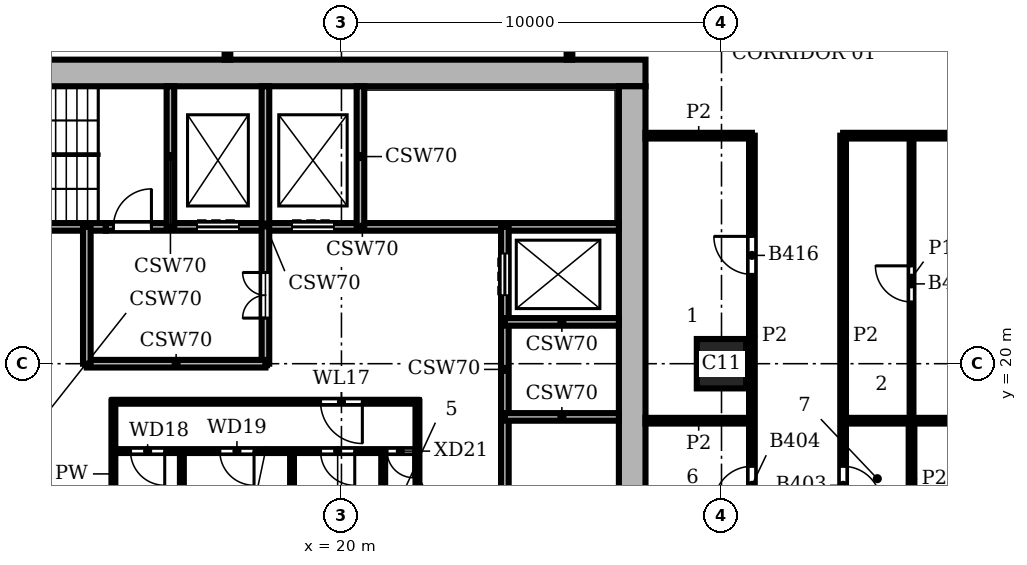
"""IFC4 building model, lengths in metres.
Left out: names, types, materials, properties, quantities, classifications, styles, units other than length and angle.
Written with IfcOpenShell. Run it as: python <this file> out.ifc"""

import sys

from ifc_helpers import new_model, si_unit, direction, frame, frame_2d, origin, origin_2d, place, context, subcontext, project, spatial, rectangle, extrude, element, fill, save


model = new_model("IFC4")
c1 = context("Model", 3, precision=1e-05, world=origin(), true_north=direction((0.0, 1.0)))
c2 = subcontext(c1, "Body", "Model", "MODEL_VIEW")
j1 = project(units=[si_unit("LENGTHUNIT", "METRE"), si_unit("PLANEANGLEUNIT", "RADIAN")], contexts=[c1])
p1 = place(None, origin())
s1 = spatial("IfcSite", under=j1, at=p1, CompositionType="ELEMENT")
p2 = place(p1, origin())
s2 = spatial("IfcBuilding", under=s1, at=p2, CompositionType="ELEMENT")
p3 = place(p2, frame((0.0, 0.0, 166.8)))
s3 = spatial("IfcBuildingStorey", under=s2, at=p3, CompositionType="ELEMENT", Elevation=166.8)
p4 = place(p3, frame((30.0, 20.0, 0.0), z_axis=(0.0, 0.0, 1.0), x_axis=(1.0, 0.0, 0.0)))
e1 = element("IfcColumn", 1, at=p4, inside=s3, PredefinedType="COLUMN", context=c2, shape_type="SweptSolid", body=[
    extrude(rectangle(XDim=1.3, YDim=1.3, at=origin_2d()), origin(), (0.0, 0.0, 1.0), 3.9),
])
p5 = place(p3, frame((27.65, 8.7, 0.0), z_axis=(0.0, 0.0, 1.0), x_axis=(0.0, 1.0, 0.0)))
e2 = element("IfcWall", 2, at=p5, inside=s3, PredefinedType="SHEAR", context=c2, shape_type="SweptSolid", body=[
    extrude(rectangle(XDim=18.6, YDim=0.7, at=frame_2d((9.3, 0.0))), origin(), (0.0, 0.0, 1.0), 3.9),
])
p6 = place(p5, frame((4.75, 0.0, 0.0)))
e3 = element("IfcOpeningElement", 3, at=p6, cuts=e2, PredefinedType="OPENING", context=c2, shape_type="SweptSolid", body=[
    extrude(rectangle(XDim=1.6, YDim=2.1, at=frame_2d((0.8, 1.05))), frame((0.0, 0.36, 0.0), z_axis=(0.0, -1.0, 0.0), x_axis=(1.0, 0.0, 0.0)), (0.0, 0.0, 1.0), 0.72),
])
p7 = place(p3, frame((28.0, 27.65, 0.0), z_axis=(0.0, 0.0, 1.0), x_axis=(-1.0, 0.0, 0.0)))
e4 = element("IfcWall", 4, at=p7, inside=s3, PredefinedType="SHEAR", context=c2, shape_type="SweptSolid", body=[
    extrude(rectangle(XDim=20.0, YDim=0.7, at=frame_2d((10.0, 0.0))), origin(), (0.0, 0.0, 1.0), 3.9),
])
p8 = place(p3, frame((14.0, 17.7, 0.0), z_axis=(0.0, 0.0, 1.0), x_axis=(1.0, 0.0, 0.0)))
e5 = element("IfcWall", 5, at=p8, inside=s3, PredefinedType="PARTITIONING", context=c2, shape_type="SweptSolid", body=[
    extrude(rectangle(XDim=8.0, YDim=0.1, at=frame_2d((4.0, 0.0))), origin(), (0.0, 0.0, 1.0), 3.58),
])
p9 = place(p8, frame((0.45, 0.0, 0.0)))
e6 = element("IfcOpeningElement", 6, at=p9, cuts=e5, PredefinedType="OPENING", context=c2, shape_type="SweptSolid", body=[
    extrude(rectangle(XDim=0.9, YDim=2.1, at=frame_2d((0.45, 1.05))), frame((0.0, 0.06, 0.0), z_axis=(0.0, -1.0, 0.0), x_axis=(1.0, 0.0, 0.0)), (0.0, 0.0, 1.0), 0.12),
])
p10 = place(p8, frame((2.8, 0.0, 0.0)))
e7 = element("IfcOpeningElement", 7, at=p10, cuts=e5, PredefinedType="OPENING", context=c2, shape_type="SweptSolid", body=[
    extrude(rectangle(XDim=0.9, YDim=2.1, at=frame_2d((0.45, 1.05))), frame((0.0, 0.06, 0.0), z_axis=(0.0, -1.0, 0.0), x_axis=(1.0, 0.0, 0.0)), (0.0, 0.0, 1.0), 0.12),
])
p11 = place(p8, frame((5.45, 0.0, 0.0)))
e8 = element("IfcOpeningElement", 8, at=p11, cuts=e5, PredefinedType="OPENING", context=c2, shape_type="SweptSolid", body=[
    extrude(rectangle(XDim=0.9, YDim=2.1, at=frame_2d((0.45, 1.05))), frame((0.0, 0.06, 0.0), z_axis=(0.0, -1.0, 0.0), x_axis=(1.0, 0.0, 0.0)), (0.0, 0.0, 1.0), 0.12),
])
p12 = place(p8, frame((7.2, 0.0, 0.0)))
e9 = element("IfcOpeningElement", 9, at=p12, cuts=e5, PredefinedType="OPENING", context=c2, shape_type="SweptSolid", body=[
    extrude(rectangle(XDim=0.7, YDim=2.1, at=frame_2d((0.35, 1.05))), frame((0.0, 0.06, 0.0), z_axis=(0.0, -1.0, 0.0), x_axis=(1.0, 0.0, 0.0)), (0.0, 0.0, 1.0), 0.12),
])
p13 = place(p3, frame((24.3, 18.6, 0.0), z_axis=(0.0, 0.0, 1.0), x_axis=(1.0, 0.0, 0.0)))
e10 = element("IfcWall", 10, at=p13, inside=s3, PredefinedType="SHEAR", context=c2, shape_type="SweptSolid", body=[
    extrude(rectangle(XDim=3.0, YDim=0.2, at=frame_2d((1.5, 0.0))), origin(), (0.0, 0.0, 1.0), 3.58),
])
p14 = place(p3, frame((14.0, 19.0, 0.0), z_axis=(0.0, 0.0, 1.0), x_axis=(1.0, 0.0, 0.0)))
e11 = element("IfcWall", 11, at=p14, inside=s3, PredefinedType="PARTITIONING", context=c2, shape_type="SweptSolid", body=[
    extrude(rectangle(XDim=8.0, YDim=0.1, at=frame_2d((4.0, 0.0))), origin(), (0.0, 0.0, 1.0), 3.58),
])
p15 = place(p14, frame((5.45, 0.0, 0.0)))
e12 = element("IfcOpeningElement", 12, at=p15, cuts=e11, PredefinedType="OPENING", context=c2, shape_type="SweptSolid", body=[
    extrude(rectangle(XDim=1.1, YDim=2.1, at=frame_2d((0.55, 1.05))), frame((0.0, 0.06, 0.0), z_axis=(0.0, -1.0, 0.0), x_axis=(1.0, 0.0, 0.0)), (0.0, 0.0, 1.0), 0.12),
])
p16 = place(p3, frame((13.3, 20.0, 0.0), z_axis=(0.0, 0.0, 1.0), x_axis=(1.0, 0.0, 0.0)))
e13 = element("IfcWall", 13, at=p16, inside=s3, PredefinedType="SHEAR", context=c2, shape_type="SweptSolid", body=[
    extrude(rectangle(XDim=4.7, YDim=0.2, at=frame_2d((2.35, 0.0))), origin(), (0.0, 0.0, 1.0), 3.58),
])
p17 = place(p3, frame((24.3, 21.1, 0.0), z_axis=(0.0, 0.0, 1.0), x_axis=(1.0, 0.0, 0.0)))
e14 = element("IfcWall", 14, at=p17, inside=s3, PredefinedType="SHEAR", context=c2, shape_type="SweptSolid", body=[
    extrude(rectangle(XDim=3.0, YDim=0.2, at=frame_2d((1.5, 0.0))), origin(), (0.0, 0.0, 1.0), 3.58),
])
p18 = place(p3, frame((8.7, 23.6, 0.0), z_axis=(0.0, 0.0, 1.0), x_axis=(1.0, 0.0, 0.0)))
e15 = element("IfcWall", 15, at=p18, inside=s3, PredefinedType="SHEAR", context=c2, shape_type="SweptSolid", body=[
    extrude(rectangle(XDim=5.1, YDim=0.2, at=frame_2d((2.55, 0.0))), origin(), (0.0, 0.0, 1.0), 3.58),
])
p19 = place(p3, frame((13.8, 23.6, 0.0), z_axis=(0.0, 0.0, 1.0), x_axis=(1.0, 0.0, 0.0)))
e16 = element("IfcWall", 16, at=p19, inside=s3, PredefinedType="SHEAR", context=c2, shape_type="SweptSolid", body=[
    extrude(rectangle(XDim=13.5, YDim=0.2, at=frame_2d((6.75, 0.0))), origin(), (0.0, 0.0, 1.0), 3.58),
])
p20 = place(p19, frame((2.4, 0.0, 0.0)))
e17 = element("IfcOpeningElement", 17, at=p20, cuts=e16, PredefinedType="OPENING", context=c2, shape_type="SweptSolid", body=[
    extrude(rectangle(XDim=1.1, YDim=2.1, at=frame_2d((0.55, 1.05))), frame((0.0, 0.11, 0.0), z_axis=(0.0, -1.0, 0.0), x_axis=(1.0, 0.0, 0.0)), (0.0, 0.0, 1.0), 0.22),
])
p21 = place(p19, frame((4.9, 0.0, 0.0)))
e18 = element("IfcOpeningElement", 18, at=p21, cuts=e16, PredefinedType="OPENING", context=c2, shape_type="SweptSolid", body=[
    extrude(rectangle(XDim=1.1, YDim=2.1, at=frame_2d((0.55, 1.05))), frame((0.0, 0.11, 0.0), z_axis=(0.0, -1.0, 0.0), x_axis=(1.0, 0.0, 0.0)), (0.0, 0.0, 1.0), 0.22),
])
p22 = place(p19, frame((0.2, 0.0, 0.0)))
e19 = element("IfcOpeningElement", 19, at=p22, cuts=e16, PredefinedType="OPENING", context=c2, shape_type="SweptSolid", body=[
    extrude(rectangle(XDim=1.0, YDim=2.1, at=frame_2d((0.5, 1.05))), frame((0.0, 0.11, 0.0), z_axis=(0.0, -1.0, 0.0), x_axis=(1.0, 0.0, 0.0)), (0.0, 0.0, 1.0), 0.22),
])
p23 = place(p3, frame((13.3, 20.0, 0.0), z_axis=(0.0, 0.0, 1.0), x_axis=(0.0, 1.0, 0.0)))
e20 = element("IfcWall", 20, at=p23, inside=s3, PredefinedType="SHEAR", context=c2, shape_type="SweptSolid", body=[
    extrude(rectangle(XDim=3.6, YDim=0.2, at=frame_2d((1.8, 0.0))), origin(), (0.0, 0.0, 1.0), 3.58),
])
p24 = place(p3, frame((14.0, 15.2, 0.0), z_axis=(0.0, 0.0, 1.0), x_axis=(0.0, 1.0, 0.0)))
e21 = element("IfcWall", 21, at=p24, inside=s3, PredefinedType="PARTITIONING", context=c2, shape_type="SweptSolid", body=[
    extrude(rectangle(XDim=3.8, YDim=0.1, at=frame_2d((1.9, 0.0))), origin(), (0.0, 0.0, 1.0), 3.58),
])
p25 = place(p3, frame((15.5, 23.6, 0.0), z_axis=(0.0, 0.0, 1.0), x_axis=(0.0, 1.0, 0.0)))
e22 = element("IfcWall", 22, at=p25, inside=s3, PredefinedType="SHEAR", context=c2, shape_type="SweptSolid", body=[
    extrude(rectangle(XDim=3.7, YDim=0.2, at=frame_2d((1.85, 0.0))), origin(), (0.0, 0.0, 1.0), 3.58),
])
p26 = place(p3, frame((15.8, 15.2, 0.0), z_axis=(0.0, 0.0, 1.0), x_axis=(0.0, 1.0, 0.0)))
e23 = element("IfcWall", 23, at=p26, inside=s3, PredefinedType="PARTITIONING", context=c2, shape_type="SweptSolid", body=[
    extrude(rectangle(XDim=2.5, YDim=0.1, at=frame_2d((1.25, 0.0))), origin(), (0.0, 0.0, 1.0), 3.58),
])
p27 = place(p3, frame((18.0, 20.0, 0.0), z_axis=(0.0, 0.0, 1.0), x_axis=(0.0, 1.0, 0.0)))
e24 = element("IfcWall", 24, at=p27, inside=s3, PredefinedType="SHEAR", context=c2, shape_type="SweptSolid", body=[
    extrude(rectangle(XDim=7.3, YDim=0.2, at=frame_2d((3.65, 0.0))), origin(), (0.0, 0.0, 1.0), 3.58),
])
p28 = place(p27, frame((1.2, 0.0, 0.0)))
e25 = element("IfcOpeningElement", 25, at=p28, cuts=e24, PredefinedType="OPENING", context=c2, shape_type="SweptSolid", body=[
    extrude(rectangle(XDim=1.2, YDim=2.1, at=frame_2d((0.6, 1.05))), frame((0.0, 0.11, 0.0), z_axis=(0.0, -1.0, 0.0), x_axis=(1.0, 0.0, 0.0)), (0.0, 0.0, 1.0), 0.22),
])
p29 = place(p3, frame((18.7, 15.2, 0.0), z_axis=(0.0, 0.0, 1.0), x_axis=(0.0, 1.0, 0.0)))
e26 = element("IfcWall", 26, at=p29, inside=s3, PredefinedType="PARTITIONING", context=c2, shape_type="SweptSolid", body=[
    extrude(rectangle(XDim=2.5, YDim=0.1, at=frame_2d((1.25, 0.0))), origin(), (0.0, 0.0, 1.0), 3.58),
])
p30 = place(p3, frame((20.5, 23.6, 0.0), z_axis=(0.0, 0.0, 1.0), x_axis=(0.0, 1.0, 0.0)))
e27 = element("IfcWall", 27, at=p30, inside=s3, PredefinedType="SHEAR", context=c2, shape_type="SweptSolid", body=[
    extrude(rectangle(XDim=3.7, YDim=0.2, at=frame_2d((1.85, 0.0))), origin(), (0.0, 0.0, 1.0), 3.58),
])
p31 = place(p3, frame((21.1, 15.2, 0.0), z_axis=(0.0, 0.0, 1.0), x_axis=(0.0, 1.0, 0.0)))
e28 = element("IfcWall", 28, at=p31, inside=s3, PredefinedType="PARTITIONING", context=c2, shape_type="SweptSolid", body=[
    extrude(rectangle(XDim=2.5, YDim=0.1, at=frame_2d((1.25, 0.0))), origin(), (0.0, 0.0, 1.0), 3.58),
])
p32 = place(p3, frame((22.0, 15.2, 0.0), z_axis=(0.0, 0.0, 1.0), x_axis=(0.0, 1.0, 0.0)))
e29 = element("IfcWall", 29, at=p32, inside=s3, PredefinedType="PARTITIONING", context=c2, shape_type="SweptSolid", body=[
    extrude(rectangle(XDim=3.8, YDim=0.1, at=frame_2d((1.9, 0.0))), origin(), (0.0, 0.0, 1.0), 3.58),
])
p33 = place(p3, frame((24.3, 16.1, 0.0), z_axis=(0.0, 0.0, 1.0), x_axis=(0.0, 1.0, 0.0)))
e30 = element("IfcWall", 30, at=p33, inside=s3, PredefinedType="SHEAR", context=c2, shape_type="SweptSolid", body=[
    extrude(rectangle(XDim=7.5, YDim=0.2, at=frame_2d((3.75, 0.0))), origin(), (0.0, 0.0, 1.0), 3.58),
])
p34 = place(p33, frame((5.7, 0.0, 0.0)))
e31 = element("IfcOpeningElement", 31, at=p34, cuts=e30, PredefinedType="OPENING", context=c2, shape_type="SweptSolid", body=[
    extrude(rectangle(XDim=1.1, YDim=2.1, at=frame_2d((0.55, 1.05))), frame((0.0, 0.11, 0.0), z_axis=(0.0, -1.0, 0.0), x_axis=(1.0, 0.0, 0.0)), (0.0, 0.0, 1.0), 0.22),
])
p35 = place(p3, frame((35.0, 18.5, 0.0), z_axis=(0.0, 0.0, 1.0), x_axis=(0.0, 1.0, 0.0)))
e32 = element("IfcWall", 32, at=p35, inside=s3, PredefinedType="PARTITIONING", context=c2, shape_type="SweptSolid", body=[
    extrude(rectangle(XDim=7.5, YDim=0.1, at=frame_2d((3.75, 0.0))), origin(), (0.0, 0.0, 1.0), 3.58),
])
p36 = place(p35, frame((3.125, 0.0, 0.0)))
e33 = element("IfcOpeningElement", 33, at=p36, cuts=e32, PredefinedType="OPENING", context=c2, shape_type="SweptSolid", body=[
    extrude(rectangle(XDim=0.95, YDim=2.1, at=frame_2d((0.475, 1.05))), frame((0.0, 0.06, 0.0), z_axis=(0.0, -1.0, 0.0), x_axis=(1.0, 0.0, 0.0)), (0.0, 0.0, 1.0), 0.12),
])
p37 = place(p3, frame((17.0, 28.0, 0.0), z_axis=(0.0, 0.0, 1.0), x_axis=(0.0, 1.0, 0.0)))
e34 = element("IfcWall", 34, at=p37, inside=s3, PredefinedType="PARTITIONING", context=c2, shape_type="SweptSolid", body=[
    extrude(rectangle(XDim=29.6, YDim=0.15, at=frame_2d((14.8, 0.0))), origin(), (0.0, 0.0, 1.0), 3.58),
])
p38 = place(p3, frame((26.0, 28.0, 0.0), z_axis=(0.0, 0.0, 1.0), x_axis=(0.0, 1.0, 0.0)))
e35 = element("IfcWall", 35, at=p38, inside=s3, PredefinedType="PARTITIONING", context=c2, shape_type="SweptSolid", body=[
    extrude(rectangle(XDim=29.6, YDim=0.15, at=frame_2d((14.8, 0.0))), origin(), (0.0, 0.0, 1.0), 3.58),
])
p39 = place(p38, frame((8.6, 0.0, 0.0)))
e36 = element("IfcOpeningElement", 36, at=p39, cuts=e35, PredefinedType="OPENING", context=c2, shape_type="SweptSolid", body=[
    extrude(rectangle(XDim=1.0, YDim=2.1, at=frame_2d((0.5, 1.05))), frame((0.0, 0.085, 0.0), z_axis=(0.0, -1.0, 0.0), x_axis=(1.0, 0.0, 0.0)), (0.0, 0.0, 1.0), 0.17),
])
p40 = place(p38, frame((22.6, 0.0, 0.0)))
e37 = element("IfcOpeningElement", 37, at=p40, cuts=e35, PredefinedType="OPENING", context=c2, shape_type="SweptSolid", body=[
    extrude(rectangle(XDim=1.0, YDim=2.1, at=frame_2d((0.5, 1.05))), frame((0.0, 0.085, 0.0), z_axis=(0.0, -1.0, 0.0), x_axis=(1.0, 0.0, 0.0)), (0.0, 0.0, 1.0), 0.17),
])
p41 = place(p3, frame((30.8, 15.45, 0.0), z_axis=(0.0, 0.0, 1.0), x_axis=(0.0, 1.0, 0.0)))
e38 = element("IfcWall", 38, at=p41, inside=s3, PredefinedType="PARTITIONING", context=c2, shape_type="SweptSolid", body=[
    extrude(rectangle(XDim=10.55, YDim=0.15, at=frame_2d((5.275, 0.0))), origin(), (0.0, 0.0, 1.0), 3.58),
])
p42 = place(p41, frame((0.85, 0.0, 0.0)))
e39 = element("IfcOpeningElement", 39, at=p42, cuts=e38, PredefinedType="OPENING", context=c2, shape_type="SweptSolid", body=[
    extrude(rectangle(XDim=1.0, YDim=2.1, at=frame_2d((0.5, 1.05))), frame((0.0, 0.085, 0.0), z_axis=(0.0, -1.0, 0.0), x_axis=(1.0, 0.0, 0.0)), (0.0, 0.0, 1.0), 0.17),
])
p43 = place(p41, frame((6.9, 0.0, 0.0)))
e40 = element("IfcOpeningElement", 40, at=p43, cuts=e38, PredefinedType="OPENING", context=c2, shape_type="SweptSolid", body=[
    extrude(rectangle(XDim=1.0, YDim=2.1, at=frame_2d((0.5, 1.05))), frame((0.0, 0.085, 0.0), z_axis=(0.0, -1.0, 0.0), x_axis=(1.0, 0.0, 0.0)), (0.0, 0.0, 1.0), 0.17),
])
p44 = place(p3, frame((33.2, 15.45, 0.0), z_axis=(0.0, 0.0, 1.0), x_axis=(0.0, 1.0, 0.0)))
e41 = element("IfcWall", 41, at=p44, inside=s3, PredefinedType="PARTITIONING", context=c2, shape_type="SweptSolid", body=[
    extrude(rectangle(XDim=10.55, YDim=0.15, at=frame_2d((5.275, 0.0))), origin(), (0.0, 0.0, 1.0), 3.58),
])
p45 = place(p44, frame((0.85, 0.0, 0.0)))
e42 = element("IfcOpeningElement", 42, at=p45, cuts=e41, PredefinedType="OPENING", context=c2, shape_type="SweptSolid", body=[
    extrude(rectangle(XDim=1.0, YDim=2.1, at=frame_2d((0.5, 1.05))), frame((0.0, 0.085, 0.0), z_axis=(0.0, -1.0, 0.0), x_axis=(1.0, 0.0, 0.0)), (0.0, 0.0, 1.0), 0.17),
])
p46 = place(p3, frame((35.0, 15.45, 0.0), z_axis=(0.0, 0.0, 1.0), x_axis=(0.0, 1.0, 0.0)))
e43 = element("IfcWall", 43, at=p46, inside=s3, PredefinedType="PARTITIONING", context=c2, shape_type="SweptSolid", body=[
    extrude(rectangle(XDim=3.05, YDim=0.15, at=frame_2d((1.525, 0.0))), origin(), (0.0, 0.0, 1.0), 3.58),
])
p47 = place(p3, frame((28.0, 18.5, 0.0), z_axis=(0.0, 0.0, 1.0), x_axis=(1.0, 0.0, 0.0)))
e44 = element("IfcWall", 44, at=p47, inside=s3, PredefinedType="PARTITIONING", context=c2, shape_type="SweptSolid", body=[
    extrude(rectangle(XDim=2.8, YDim=0.15, at=frame_2d((1.4, 0.0))), origin(), (0.0, 0.0, 1.0), 3.58),
])
p48 = place(p3, frame((33.2, 18.5, 0.0), z_axis=(0.0, 0.0, 1.0), x_axis=(1.0, 0.0, 0.0)))
e45 = element("IfcWall", 45, at=p48, inside=s3, PredefinedType="PARTITIONING", context=c2, shape_type="SweptSolid", body=[
    extrude(rectangle(XDim=21.8, YDim=0.15, at=frame_2d((10.9, 0.0))), origin(), (0.0, 0.0, 1.0), 3.58),
])
p49 = place(p3, frame((28.0, 26.0, 0.0), z_axis=(0.0, 0.0, 1.0), x_axis=(1.0, 0.0, 0.0)))
e46 = element("IfcWall", 46, at=p49, inside=s3, PredefinedType="PARTITIONING", context=c2, shape_type="SweptSolid", body=[
    extrude(rectangle(XDim=2.8, YDim=0.15, at=frame_2d((1.4, 0.0))), origin(), (0.0, 0.0, 1.0), 3.58),
])
p50 = place(p3, frame((33.2, 26.0, 0.0), z_axis=(0.0, 0.0, 1.0), x_axis=(1.0, 0.0, 0.0)))
e47 = element("IfcWall", 47, at=p50, inside=s3, PredefinedType="PARTITIONING", context=c2, shape_type="SweptSolid", body=[
    extrude(rectangle(XDim=16.8, YDim=0.15, at=frame_2d((8.4, 0.0))), origin(), (0.0, 0.0, 1.0), 3.58),
])
p51 = place(p50, frame((10.65, 0.0, 0.0)))
e48 = element("IfcOpeningElement", 48, at=p51, cuts=e47, PredefinedType="OPENING", context=c2, shape_type="SweptSolid", body=[
    extrude(rectangle(XDim=1.0, YDim=2.1, at=frame_2d((0.5, 1.05))), frame((0.0, 0.085, 0.0), z_axis=(0.0, -1.0, 0.0), x_axis=(1.0, 0.0, 0.0)), (0.0, 0.0, 1.0), 0.17),
])
p52 = place(p34, origin())
e49 = element("IfcDoor", 49, at=p52, inside=s3, OperationType="DOUBLE_DOOR_SLIDING", PredefinedType="DOOR", context=c2, shape_type="SweptSolid", body=[
    extrude(rectangle(XDim=1.1, YDim=2.1, at=frame_2d((0.55, 1.05))), frame((0.0, 0.025, 0.0), z_axis=(0.0, -1.0, 0.0), x_axis=(1.0, 0.0, 0.0)), (0.0, 0.0, 1.0), 0.05),
])
fill(e31, e49)
p53 = place(p20, origin())
e50 = element("IfcDoor", 50, at=p53, inside=s3, OperationType="DOUBLE_DOOR_SLIDING", PredefinedType="DOOR", context=c2, shape_type="SweptSolid", body=[
    extrude(rectangle(XDim=1.1, YDim=2.1, at=frame_2d((0.55, 1.05))), frame((0.0, 0.025, 0.0), z_axis=(0.0, -1.0, 0.0), x_axis=(1.0, 0.0, 0.0)), (0.0, 0.0, 1.0), 0.05),
])
fill(e17, e50)
p54 = place(p21, origin())
e51 = element("IfcDoor", 51, at=p54, inside=s3, OperationType="DOUBLE_DOOR_SLIDING", PredefinedType="DOOR", context=c2, shape_type="SweptSolid", body=[
    extrude(rectangle(XDim=1.1, YDim=2.1, at=frame_2d((0.55, 1.05))), frame((0.0, 0.025, 0.0), z_axis=(0.0, -1.0, 0.0), x_axis=(1.0, 0.0, 0.0)), (0.0, 0.0, 1.0), 0.05),
])
fill(e18, e51)
p55 = place(p22, origin())
e52 = element("IfcDoor", 52, at=p55, inside=s3, OperationType="SINGLE_SWING_RIGHT", PredefinedType="DOOR", context=c2, shape_type="SweptSolid", body=[
    extrude(rectangle(XDim=1.0, YDim=2.1, at=frame_2d((0.5, 1.05))), frame((0.0, 0.025, 0.0), z_axis=(0.0, -1.0, 0.0), x_axis=(1.0, 0.0, 0.0)), (0.0, 0.0, 1.0), 0.05),
])
fill(e19, e52)
p56 = place(p28, origin())
e53 = element("IfcDoor", 53, at=p56, inside=s3, OperationType="DOUBLE_DOOR_SINGLE_SWING", PredefinedType="DOOR", context=c2, shape_type="SweptSolid", body=[
    extrude(rectangle(XDim=1.2, YDim=2.1, at=frame_2d((0.6, 1.05))), frame((0.0, 0.025, 0.0), z_axis=(0.0, -1.0, 0.0), x_axis=(1.0, 0.0, 0.0)), (0.0, 0.0, 1.0), 0.05),
])
fill(e25, e53)
p57 = place(p15, frame((1.1, 0.0, 0.0), z_axis=(0.0, 0.0, 1.0), x_axis=(-1.0, 0.0, 0.0)))
e54 = element("IfcDoor", 54, at=p57, inside=s3, OperationType="SINGLE_SWING_LEFT", PredefinedType="DOOR", context=c2, shape_type="SweptSolid", body=[
    extrude(rectangle(XDim=1.1, YDim=2.1, at=frame_2d((0.55, 1.05))), frame((0.0, 0.025, 0.0), z_axis=(0.0, -1.0, 0.0), x_axis=(1.0, 0.0, 0.0)), (0.0, 0.0, 1.0), 0.05),
])
fill(e12, e54)
p58 = place(p9, frame((0.9, 0.0, 0.0), z_axis=(0.0, 0.0, 1.0), x_axis=(-1.0, 0.0, 0.0)))
e55 = element("IfcDoor", 55, at=p58, inside=s3, OperationType="SINGLE_SWING_LEFT", PredefinedType="DOOR", context=c2, shape_type="SweptSolid", body=[
    extrude(rectangle(XDim=0.9, YDim=2.1, at=frame_2d((0.45, 1.05))), frame((0.0, 0.025, 0.0), z_axis=(0.0, -1.0, 0.0), x_axis=(1.0, 0.0, 0.0)), (0.0, 0.0, 1.0), 0.05),
])
fill(e6, e55)
p59 = place(p10, frame((0.9, 0.0, 0.0), z_axis=(0.0, 0.0, 1.0), x_axis=(-1.0, 0.0, 0.0)))
e56 = element("IfcDoor", 56, at=p59, inside=s3, OperationType="SINGLE_SWING_LEFT", PredefinedType="DOOR", context=c2, shape_type="SweptSolid", body=[
    extrude(rectangle(XDim=0.9, YDim=2.1, at=frame_2d((0.45, 1.05))), frame((0.0, 0.025, 0.0), z_axis=(0.0, -1.0, 0.0), x_axis=(1.0, 0.0, 0.0)), (0.0, 0.0, 1.0), 0.05),
])
fill(e7, e56)
p60 = place(p11, frame((0.9, 0.0, 0.0), z_axis=(0.0, 0.0, 1.0), x_axis=(-1.0, 0.0, 0.0)))
e57 = element("IfcDoor", 57, at=p60, inside=s3, OperationType="SINGLE_SWING_LEFT", PredefinedType="DOOR", context=c2, shape_type="SweptSolid", body=[
    extrude(rectangle(XDim=0.9, YDim=2.1, at=frame_2d((0.45, 1.05))), frame((0.0, 0.025, 0.0), z_axis=(0.0, -1.0, 0.0), x_axis=(1.0, 0.0, 0.0)), (0.0, 0.0, 1.0), 0.05),
])
fill(e8, e57)
p61 = place(p12, frame((0.7, 0.0, 0.0), z_axis=(0.0, 0.0, 1.0), x_axis=(-1.0, 0.0, 0.0)))
e58 = element("IfcDoor", 58, at=p61, inside=s3, OperationType="SINGLE_SWING_LEFT", PredefinedType="DOOR", context=c2, shape_type="SweptSolid", body=[
    extrude(rectangle(XDim=0.7, YDim=2.1, at=frame_2d((0.35, 1.05))), frame((0.0, 0.025, 0.0), z_axis=(0.0, -1.0, 0.0), x_axis=(1.0, 0.0, 0.0)), (0.0, 0.0, 1.0), 0.05),
])
fill(e9, e58)
p62 = place(p45, frame((1.0, 0.0, 0.0), z_axis=(0.0, 0.0, 1.0), x_axis=(-1.0, 0.0, 0.0)))
e59 = element("IfcDoor", 59, at=p62, inside=s3, OperationType="SINGLE_SWING_RIGHT", PredefinedType="DOOR", context=c2, shape_type="SweptSolid", body=[
    extrude(rectangle(XDim=1.0, YDim=2.1, at=frame_2d((0.5, 1.05))), frame((0.0, 0.025, 0.0), z_axis=(0.0, -1.0, 0.0), x_axis=(1.0, 0.0, 0.0)), (0.0, 0.0, 1.0), 0.05),
])
fill(e42, e59)
p63 = place(p42, origin())
e60 = element("IfcDoor", 60, at=p63, inside=s3, OperationType="SINGLE_SWING_LEFT", PredefinedType="DOOR", context=c2, shape_type="SweptSolid", body=[
    extrude(rectangle(XDim=1.0, YDim=2.1, at=frame_2d((0.5, 1.05))), frame((0.0, 0.025, 0.0), z_axis=(0.0, -1.0, 0.0), x_axis=(1.0, 0.0, 0.0)), (0.0, 0.0, 1.0), 0.05),
])
fill(e39, e60)
p64 = place(p43, origin())
e61 = element("IfcDoor", 61, at=p64, inside=s3, OperationType="SINGLE_SWING_RIGHT", PredefinedType="DOOR", context=c2, shape_type="SweptSolid", body=[
    extrude(rectangle(XDim=1.0, YDim=2.1, at=frame_2d((0.5, 1.05))), frame((0.0, 0.025, 0.0), z_axis=(0.0, -1.0, 0.0), x_axis=(1.0, 0.0, 0.0)), (0.0, 0.0, 1.0), 0.05),
])
fill(e40, e61)
p65 = place(p36, origin())
e62 = element("IfcDoor", 62, at=p65, inside=s3, OperationType="SINGLE_SWING_RIGHT", PredefinedType="DOOR", context=c2, shape_type="SweptSolid", body=[
    extrude(rectangle(XDim=0.95, YDim=2.1, at=frame_2d((0.475, 1.05))), frame((0.0, 0.025, 0.0), z_axis=(0.0, -1.0, 0.0), x_axis=(1.0, 0.0, 0.0)), (0.0, 0.0, 1.0), 0.05),
])
fill(e33, e62)
save(model, sys.argv[1])
